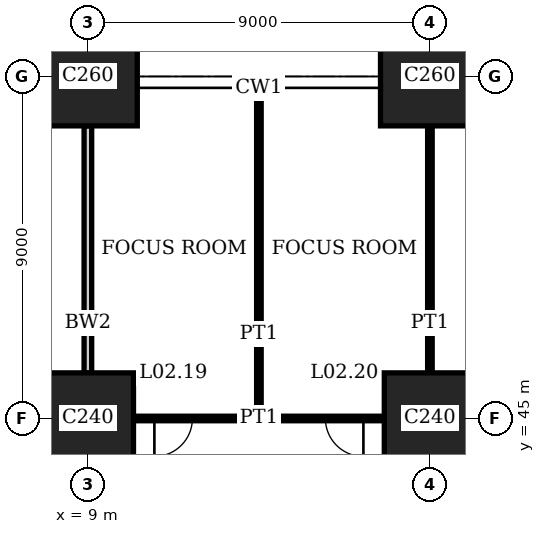
"""IFC4 building model, lengths in metres.
Left out: names, types, materials, properties, quantities, classifications, styles, units other than length and angle.
Written with IfcOpenShell. Run it as: python <this file> out.ifc"""

import sys

from ifc_helpers import new_model, si_unit, direction, frame, frame_2d, origin, origin_2d, place, context, subcontext, project, spatial, rectangle, extrude, element, fill, save


model = new_model("IFC4")
c1 = context("Model", 3, precision=1e-05, world=origin(), true_north=direction((0.0, 1.0)))
c2 = subcontext(c1, "Body", "Model", "MODEL_VIEW")
j1 = project(units=[si_unit("LENGTHUNIT", "METRE"), si_unit("PLANEANGLEUNIT", "RADIAN")], contexts=[c1])
p1 = place(None, origin())
s1 = spatial("IfcSite", under=j1, at=p1, CompositionType="ELEMENT")
p2 = place(p1, origin())
s2 = spatial("IfcBuilding", under=s1, at=p2, CompositionType="ELEMENT")
p3 = place(p2, frame((0.0, 0.0, 10.8)))
s3 = spatial("IfcBuildingStorey", under=s2, at=p3, CompositionType="ELEMENT", Elevation=10.8)
p4 = place(p3, frame((9.0, 45.0, 0.0), z_axis=(0.0, 0.0, 1.0), x_axis=(1.0, 0.0, 0.0)))
e1 = element("IfcColumn", 1, at=p4, inside=s3, PredefinedType="COLUMN", context=c2, shape_type="SweptSolid", body=[
    extrude(rectangle(XDim=2.4, YDim=2.4, at=origin_2d()), origin(), (0.0, 0.0, 1.0), 5.0),
])
p5 = place(p3, frame((9.0, 54.0, 0.0), z_axis=(0.0, 0.0, 1.0), x_axis=(1.0, 0.0, 0.0)))
e2 = element("IfcColumn", 2, at=p5, inside=s3, PredefinedType="COLUMN", context=c2, shape_type="SweptSolid", body=[
    extrude(rectangle(XDim=2.6, YDim=2.6, at=origin_2d()), origin(), (0.0, 0.0, 1.0), 5.0),
])
p6 = place(p3, frame((18.0, 45.0, 0.0), z_axis=(0.0, 0.0, 1.0), x_axis=(1.0, 0.0, 0.0)))
e3 = element("IfcColumn", 3, at=p6, inside=s3, PredefinedType="COLUMN", context=c2, shape_type="SweptSolid", body=[
    extrude(rectangle(XDim=2.4, YDim=2.4, at=origin_2d()), origin(), (0.0, 0.0, 1.0), 5.0),
])
p7 = place(p3, frame((18.0, 54.0, 0.0), z_axis=(0.0, 0.0, 1.0), x_axis=(1.0, 0.0, 0.0)))
e4 = element("IfcColumn", 4, at=p7, inside=s3, PredefinedType="COLUMN", context=c2, shape_type="SweptSolid", body=[
    extrude(rectangle(XDim=2.6, YDim=2.6, at=origin_2d()), origin(), (0.0, 0.0, 1.0), 5.0),
])
p8 = place(p3, frame((9.0, 46.2, 0.0), z_axis=(0.0, 0.0, 1.0), x_axis=(0.0, 1.0, 0.0)))
e5 = element("IfcWall", 5, at=p8, inside=s3, PredefinedType="SOLIDWALL", context=c2, shape_type="SweptSolid", body=[
    extrude(rectangle(XDim=6.5, YDim=0.2, at=frame_2d((3.25, 0.0))), origin(), (0.0, 0.0, 1.0), 3.8),
])
p9 = place(p3, frame((10.2, 45.0, 0.0), z_axis=(0.0, 0.0, 1.0), x_axis=(1.0, 0.0, 0.0)))
e6 = element("IfcWall", 6, at=p9, inside=s3, PredefinedType="PARTITIONING", context=c2, shape_type="SweptSolid", body=[
    extrude(rectangle(XDim=6.6, YDim=0.12, at=frame_2d((3.3, 0.0))), origin(), (0.0, 0.0, 1.0), 3.8),
])
p10 = place(p9, frame((0.55, 0.0, 0.0)))
e7 = element("IfcOpeningElement", 7, at=p10, cuts=e6, PredefinedType="OPENING", context=c2, shape_type="SweptSolid", body=[
    extrude(rectangle(XDim=1.0, YDim=2.4, at=frame_2d((0.5, 1.2))), frame((0.0, 0.07, 0.0), z_axis=(0.0, -1.0, 0.0), x_axis=(1.0, 0.0, 0.0)), (0.0, 0.0, 1.0), 0.14),
])
p11 = place(p9, frame((5.05, 0.0, 0.0)))
e8 = element("IfcOpeningElement", 8, at=p11, cuts=e6, PredefinedType="OPENING", context=c2, shape_type="SweptSolid", body=[
    extrude(rectangle(XDim=1.0, YDim=2.4, at=frame_2d((0.5, 1.2))), frame((0.0, 0.07, 0.0), z_axis=(0.0, -1.0, 0.0), x_axis=(1.0, 0.0, 0.0)), (0.0, 0.0, 1.0), 0.14),
])
p12 = place(p3, frame((13.5, 45.0, 0.0), z_axis=(0.0, 0.0, 1.0), x_axis=(0.0, 1.0, 0.0)))
e9 = element("IfcWall", 9, at=p12, inside=s3, PredefinedType="PARTITIONING", context=c2, shape_type="SweptSolid", body=[
    extrude(rectangle(XDim=8.69, YDim=0.12, at=frame_2d((4.345, 0.0))), origin(), (0.0, 0.0, 1.0), 4.6),
])
p13 = place(p3, frame((18.0, 46.2, 0.0), z_axis=(0.0, 0.0, 1.0), x_axis=(0.0, 1.0, 0.0)))
e10 = element("IfcWall", 10, at=p13, inside=s3, PredefinedType="PARTITIONING", context=c2, shape_type="SweptSolid", body=[
    extrude(rectangle(XDim=6.5, YDim=0.12, at=frame_2d((3.25, 0.0))), origin(), (0.0, 0.0, 1.0), 3.8),
])
p14 = place(p10, origin())
e11 = element("IfcDoor", 11, at=p14, inside=s3, OperationType="SINGLE_SWING_LEFT", PredefinedType="DOOR", context=c2, shape_type="SweptSolid", body=[
    extrude(rectangle(XDim=1.0, YDim=2.4, at=frame_2d((0.5, 1.2))), frame((0.0, 0.025, 0.0), z_axis=(0.0, -1.0, 0.0), x_axis=(1.0, 0.0, 0.0)), (0.0, 0.0, 1.0), 0.05),
])
fill(e7, e11)
p15 = place(p11, origin())
e12 = element("IfcDoor", 12, at=p15, inside=s3, OperationType="SINGLE_SWING_RIGHT", PredefinedType="DOOR", context=c2, shape_type="SweptSolid", body=[
    extrude(rectangle(XDim=1.0, YDim=2.4, at=frame_2d((0.5, 1.2))), frame((0.0, 0.025, 0.0), z_axis=(0.0, -1.0, 0.0), x_axis=(1.0, 0.0, 0.0)), (0.0, 0.0, 1.0), 0.05),
])
fill(e8, e12)
save(model, sys.argv[1])
